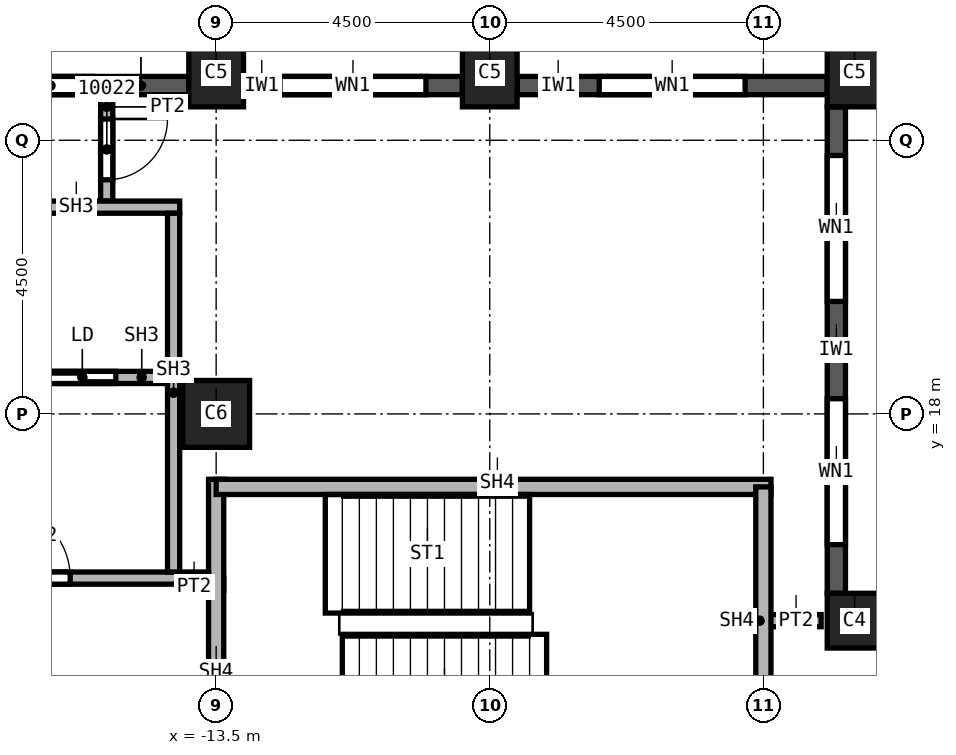
"""IFC4 building model, lengths in metres.
Left out: names, types, materials, properties, quantities, classifications, styles, units other than length and angle.
Written with IfcOpenShell. Run it as: python <this file> out.ifc"""

import sys

from ifc_helpers import new_model, si_unit, direction, frame, frame_2d, origin, origin_2d, place, context, subcontext, project, spatial, rectangle, extrude, element, fill, save


model = new_model("IFC4")
c1 = context("Model", 3, precision=1e-05, world=origin(), true_north=direction((0.0, 1.0)))
c2 = subcontext(c1, "Body", "Model", "MODEL_VIEW")
j1 = project(units=[si_unit("LENGTHUNIT", "METRE"), si_unit("PLANEANGLEUNIT", "RADIAN")], contexts=[c1])
p1 = place(None, origin())
s1 = spatial("IfcSite", under=j1, at=p1, CompositionType="ELEMENT")
p2 = place(p1, origin())
s2 = spatial("IfcBuilding", under=s1, at=p2, CompositionType="ELEMENT")
p3 = place(p2, frame((0.0, 0.0, 174.0)))
s3 = spatial("IfcBuildingStorey", under=s2, at=p3, CompositionType="ELEMENT", Elevation=174.0)
p4 = place(p3, frame((-13.5, 18.0, 0.0), z_axis=(0.0, 0.0, 1.0), x_axis=(1.0, 0.0, 0.0)))
e1 = element("IfcColumn", 1, at=p4, inside=s3, PredefinedType="COLUMN", context=c2, shape_type="SweptSolid", body=[
    extrude(rectangle(XDim=1.1, YDim=1.1, at=origin_2d()), origin(), (0.0, 0.0, 1.0), 3.59),
])
for number, where, z_axis, x_axis in (
    (2, (-3.0, 23.6, 0.0), (0.0, 0.0, 1.0), (1.0, 0.0, 0.0)),
    (3, (-9.0, 23.6, 0.0), (0.0, 0.0, 1.0), (1.0, 0.0, 0.0)),
    (4, (-13.5, 23.6, 0.0), (0.0, 0.0, 1.0), (1.0, 0.0, 0.0)),
):
    element("IfcColumn", number, at=place(p3, frame(where, z_axis=z_axis, x_axis=x_axis)), inside=s3, PredefinedType="COLUMN", context=c2, shape_type="SweptSolid", body=[
        extrude(rectangle(XDim=0.9, YDim=1.1, at=origin_2d()), origin(), (0.0, 0.0, 1.0), 3.59),
    ])
p5 = place(p3, frame((-3.0, 14.6, 0.0), z_axis=(0.0, 0.0, 1.0), x_axis=(1.0, 0.0, 0.0)))
e5 = element("IfcColumn", 5, at=p5, inside=s3, PredefinedType="COLUMN", context=c2, shape_type="SweptSolid", body=[
    extrude(rectangle(XDim=0.9, YDim=0.9, at=origin_2d()), origin(), (0.0, 0.0, 1.0), 3.59),
])
p6 = place(p3, frame((-3.3, 15.05, 0.0), z_axis=(0.0, 0.0, 1.0), x_axis=(0.0, 1.0, 0.0)))
e6 = element("IfcWall", 6, at=p6, inside=s3, PredefinedType="SOLIDWALL", context=c2, shape_type="SweptSolid", body=[
    extrude(rectangle(XDim=8.0, YDim=0.3, at=frame_2d((4.0, 0.0))), origin(), (0.0, 0.0, 1.0), 2.99),
])
p7 = place(p6, frame((0.8, 0.0, 0.8)))
e7 = element("IfcOpeningElement", 7, at=p7, cuts=e6, PredefinedType="OPENING", context=c2, shape_type="SweptSolid", body=[
    extrude(rectangle(XDim=2.4, YDim=1.95, at=frame_2d((1.2, 0.975))), frame((0.0, 0.15, 0.0), z_axis=(0.0, -1.0, 0.0), x_axis=(1.0, 0.0, 0.0)), (0.0, 0.0, 1.0), 0.3),
])
p8 = place(p6, frame((4.8, 0.0, 0.8)))
e8 = element("IfcOpeningElement", 8, at=p8, cuts=e6, PredefinedType="OPENING", context=c2, shape_type="SweptSolid", body=[
    extrude(rectangle(XDim=2.4, YDim=1.95, at=frame_2d((1.2, 0.975))), frame((0.0, 0.15, 0.0), z_axis=(0.0, -1.0, 0.0), x_axis=(1.0, 0.0, 0.0)), (0.0, 0.0, 1.0), 0.3),
])
p9 = place(p3, frame((-3.45, 23.4, 0.0), z_axis=(0.0, 0.0, 1.0), x_axis=(-1.0, 0.0, 0.0)))
e9 = element("IfcWall", 9, at=p9, inside=s3, PredefinedType="SOLIDWALL", context=c2, shape_type="SweptSolid", body=[
    extrude(rectangle(XDim=5.1, YDim=0.3, at=frame_2d((2.55, 0.0))), origin(), (0.0, 0.0, 1.0), 2.99),
])
p10 = place(p9, frame((1.35, 0.0, 0.8)))
e10 = element("IfcOpeningElement", 10, at=p10, cuts=e9, PredefinedType="OPENING", context=c2, shape_type="SweptSolid", body=[
    extrude(rectangle(XDim=2.4, YDim=1.95, at=frame_2d((1.2, 0.975))), frame((0.0, 0.15, 0.0), z_axis=(0.0, -1.0, 0.0), x_axis=(1.0, 0.0, 0.0)), (0.0, 0.0, 1.0), 0.3),
])
p11 = place(p3, frame((-9.45, 23.4, 0.0), z_axis=(0.0, 0.0, 1.0), x_axis=(-1.0, 0.0, 0.0)))
e11 = element("IfcWall", 11, at=p11, inside=s3, PredefinedType="SOLIDWALL", context=c2, shape_type="SweptSolid", body=[
    extrude(rectangle(XDim=3.6, YDim=0.3, at=frame_2d((1.8, 0.0))), origin(), (0.0, 0.0, 1.0), 2.99),
])
p12 = place(p11, frame((0.6, 0.0, 0.8)))
e12 = element("IfcOpeningElement", 12, at=p12, cuts=e11, PredefinedType="OPENING", context=c2, shape_type="SweptSolid", body=[
    extrude(rectangle(XDim=2.4, YDim=1.95, at=frame_2d((1.2, 0.975))), frame((0.0, 0.15, 0.0), z_axis=(0.0, -1.0, 0.0), x_axis=(1.0, 0.0, 0.0)), (0.0, 0.0, 1.0), 0.3),
])
p13 = place(p3, frame((-13.95, 23.4, 0.0), z_axis=(0.0, 0.0, 1.0), x_axis=(-1.0, 0.0, 0.0)))
e13 = element("IfcWall", 13, at=p13, inside=s3, PredefinedType="SOLIDWALL", context=c2, shape_type="SweptSolid", body=[
    extrude(rectangle(XDim=3.6, YDim=0.3, at=frame_2d((1.8, 0.0))), origin(), (0.0, 0.0, 1.0), 2.99),
])
p14 = place(p13, frame((1.575, 0.0, 0.8)))
e14 = element("IfcOpeningElement", 14, at=p14, cuts=e13, PredefinedType="OPENING", context=c2, shape_type="SweptSolid", body=[
    extrude(rectangle(XDim=1.4, YDim=1.95, at=frame_2d((0.7, 0.975))), frame((0.0, 0.15, 0.0), z_axis=(0.0, -1.0, 0.0), x_axis=(1.0, 0.0, 0.0)), (0.0, 0.0, 1.0), 0.3),
])
p15 = place(p3, frame((-15.3, 23.25, 0.0), z_axis=(0.0, 0.0, 1.0), x_axis=(0.0, -1.0, 0.0)))
e15 = element("IfcWall", 15, at=p15, inside=s3, PredefinedType="PARTITIONING", context=c2, shape_type="SweptSolid", body=[
    extrude(rectangle(XDim=1.75, YDim=0.2, at=frame_2d((0.875, 0.0))), origin(), (0.0, 0.0, 1.0), 3.59),
])
p16 = place(p15, frame((0.4, 0.0, 0.0)))
e16 = element("IfcOpeningElement", 16, at=p16, cuts=e15, PredefinedType="OPENING", context=c2, shape_type="SweptSolid", body=[
    extrude(rectangle(XDim=1.0, YDim=2.1, at=frame_2d((0.5, 1.05))), frame((0.0, 0.1, 0.0), z_axis=(0.0, -1.0, 0.0), x_axis=(1.0, 0.0, 0.0)), (0.0, 0.0, 1.0), 0.2),
])
p17 = place(p3, frame((-14.1, 15.2, 0.0), z_axis=(0.0, 0.0, 1.0), x_axis=(1.0, 0.0, 0.0)))
e17 = element("IfcWall", 17, at=p17, inside=s3, PredefinedType="PARTITIONING", context=c2, shape_type="SweptSolid", body=[
    extrude(rectangle(XDim=0.725, YDim=0.2, at=frame_2d((0.363, 0.0))), origin(), (0.0, 0.0, 1.0), 3.59),
])
p18 = place(p3, frame((-4.5, 14.6, 0.0), z_axis=(0.0, 0.0, 1.0), x_axis=(1.0, 0.0, 0.0)))
e18 = element("IfcWall", 18, at=p18, inside=s3, PredefinedType="PARTITIONING", context=c2, shape_type="SweptSolid", body=[
    extrude(rectangle(XDim=0.95, YDim=0.2, at=frame_2d((0.475, 0.0))), origin(), (0.0, 0.0, 1.0), 3.59),
])
p19 = place(p3, frame((-13.5, 12.175, 0.0), z_axis=(0.0, 0.0, 1.0), x_axis=(0.0, 1.0, 0.0)))
e19 = element("IfcWall", 19, at=p19, inside=s3, PredefinedType="SOLIDWALL", context=c2, shape_type="SweptSolid", body=[
    extrude(rectangle(XDim=4.75, YDim=0.25, at=frame_2d((2.375, 0.0))), origin(), (0.0, 0.0, 1.0), 3.59),
])
p20 = place(p3, frame((-13.5, 16.8, 0.0), z_axis=(0.0, 0.0, 1.0), x_axis=(1.0, 0.0, 0.0)))
e20 = element("IfcWall", 20, at=p20, inside=s3, PredefinedType="SOLIDWALL", context=c2, shape_type="SweptSolid", body=[
    extrude(rectangle(XDim=9.125, YDim=0.25, at=frame_2d((4.562, 0.0))), origin(), (0.0, 0.0, 1.0), 3.59),
])
p21 = place(p3, frame((-4.5, 16.8, 0.0), z_axis=(0.0, 0.0, 1.0), x_axis=(0.0, -1.0, 0.0)))
e21 = element("IfcWall", 21, at=p21, inside=s3, PredefinedType="SOLIDWALL", context=c2, shape_type="SweptSolid", body=[
    extrude(rectangle(XDim=4.5, YDim=0.25, at=frame_2d((2.25, 0.0))), origin(), (0.0, 0.0, 1.0), 3.59),
])
p22 = place(p3, frame((-21.9, 15.3, 0.0), z_axis=(0.0, 0.0, 1.0), x_axis=(1.0, 0.0, 0.0)))
e22 = element("IfcWall", 22, at=p22, inside=s3, PredefinedType="SOLIDWALL", context=c2, shape_type="SweptSolid", body=[
    extrude(rectangle(XDim=8.275, YDim=0.2, at=frame_2d((4.137, 0.0))), origin(), (0.0, 0.0, 1.0), 3.59),
])
p23 = place(p22, frame((4.8, 0.0, 0.0)))
e23 = element("IfcOpeningElement", 23, at=p23, cuts=e22, PredefinedType="OPENING", context=c2, shape_type="SweptSolid", body=[
    extrude(rectangle(XDim=1.2, YDim=2.1, at=frame_2d((0.6, 1.05))), frame((0.0, 0.1, 0.0), z_axis=(0.0, -1.0, 0.0), x_axis=(1.0, 0.0, 0.0)), (0.0, 0.0, 1.0), 0.2),
])
p24 = place(p3, frame((-21.9, 21.4, 0.0), z_axis=(0.0, 0.0, 1.0), x_axis=(1.0, 0.0, 0.0)))
e24 = element("IfcWall", 24, at=p24, inside=s3, PredefinedType="SOLIDWALL", context=c2, shape_type="SweptSolid", body=[
    extrude(rectangle(XDim=7.8, YDim=0.2, at=frame_2d((3.9, 0.0))), origin(), (0.0, 0.0, 1.0), 3.59),
])
p25 = place(p24, frame((3.2, 0.0, 0.0)))
e25 = element("IfcOpeningElement", 25, at=p25, cuts=e24, PredefinedType="OPENING", context=c2, shape_type="SweptSolid", body=[
    extrude(rectangle(XDim=1.2, YDim=2.1, at=frame_2d((0.6, 1.05))), frame((0.0, 0.1, 0.0), z_axis=(0.0, -1.0, 0.0), x_axis=(1.0, 0.0, 0.0)), (0.0, 0.0, 1.0), 0.2),
])
p26 = place(p3, frame((-14.2, 15.4, 0.0), z_axis=(0.0, 0.0, 1.0), x_axis=(0.0, 1.0, 0.0)))
e26 = element("IfcWall", 26, at=p26, inside=s3, PredefinedType="SOLIDWALL", context=c2, shape_type="SweptSolid", body=[
    extrude(rectangle(XDim=5.9, YDim=0.2, at=frame_2d((2.95, 0.0))), origin(), (0.0, 0.0, 1.0), 3.59),
])
p27 = place(p3, frame((-17.1, 18.6, 0.0), z_axis=(0.0, 0.0, 1.0), x_axis=(1.0, 0.0, 0.0)))
e27 = element("IfcWall", 27, at=p27, inside=s3, PredefinedType="SOLIDWALL", context=c2, shape_type="SweptSolid", body=[
    extrude(rectangle(XDim=2.8, YDim=0.2, at=frame_2d((1.4, 0.0))), origin(), (0.0, 0.0, 1.0), 3.59),
])
p28 = place(p27, frame((0.85, 0.0, 0.0)))
e28 = element("IfcOpeningElement", 28, at=p28, cuts=e27, PredefinedType="OPENING", context=c2, shape_type="SweptSolid", body=[
    extrude(rectangle(XDim=1.1, YDim=2.1, at=frame_2d((0.55, 1.05))), frame((0.0, 0.1, 0.0), z_axis=(0.0, -1.0, 0.0), x_axis=(1.0, 0.0, 0.0)), (0.0, 0.0, 1.0), 0.2),
])
p29 = place(p7, origin())
e29 = element("IfcWindow", 29, at=p29, inside=s3, PartitioningType="SINGLE_PANEL", PredefinedType="WINDOW", context=c2, shape_type="SweptSolid", body=[
    extrude(rectangle(XDim=2.4, YDim=1.95, at=frame_2d((1.2, 0.975))), frame((0.0, 0.03, 0.0), z_axis=(0.0, -1.0, 0.0), x_axis=(1.0, 0.0, 0.0)), (0.0, 0.0, 1.0), 0.06),
])
fill(e7, e29)
p30 = place(p8, origin())
e30 = element("IfcWindow", 30, at=p30, inside=s3, PartitioningType="SINGLE_PANEL", PredefinedType="WINDOW", context=c2, shape_type="SweptSolid", body=[
    extrude(rectangle(XDim=2.4, YDim=1.95, at=frame_2d((1.2, 0.975))), frame((0.0, 0.03, 0.0), z_axis=(0.0, -1.0, 0.0), x_axis=(1.0, 0.0, 0.0)), (0.0, 0.0, 1.0), 0.06),
])
fill(e8, e30)
p31 = place(p10, origin())
e31 = element("IfcWindow", 31, at=p31, inside=s3, PartitioningType="SINGLE_PANEL", PredefinedType="WINDOW", context=c2, shape_type="SweptSolid", body=[
    extrude(rectangle(XDim=2.4, YDim=1.95, at=frame_2d((1.2, 0.975))), frame((0.0, 0.03, 0.0), z_axis=(0.0, -1.0, 0.0), x_axis=(1.0, 0.0, 0.0)), (0.0, 0.0, 1.0), 0.06),
])
fill(e10, e31)
p32 = place(p12, origin())
e32 = element("IfcWindow", 32, at=p32, inside=s3, PartitioningType="SINGLE_PANEL", PredefinedType="WINDOW", context=c2, shape_type="SweptSolid", body=[
    extrude(rectangle(XDim=2.4, YDim=1.95, at=frame_2d((1.2, 0.975))), frame((0.0, 0.03, 0.0), z_axis=(0.0, -1.0, 0.0), x_axis=(1.0, 0.0, 0.0)), (0.0, 0.0, 1.0), 0.06),
])
fill(e12, e32)
p33 = place(p16, origin())
e33 = element("IfcDoor", 33, at=p33, inside=s3, OperationType="SINGLE_SWING_LEFT", PredefinedType="DOOR", context=c2, shape_type="SweptSolid", body=[
    extrude(rectangle(XDim=1.0, YDim=2.1, at=frame_2d((0.5, 1.05))), frame((0.0, 0.025, 0.0), z_axis=(0.0, -1.0, 0.0), x_axis=(1.0, 0.0, 0.0)), (0.0, 0.0, 1.0), 0.05),
])
fill(e16, e33)
p34 = place(p28, origin())
e34 = element("IfcDoor", 34, at=p34, inside=s3, OperationType="SLIDING_TO_LEFT", PredefinedType="DOOR", context=c2, shape_type="SweptSolid", body=[
    extrude(rectangle(XDim=1.1, YDim=2.1, at=frame_2d((0.55, 1.05))), frame((0.0, 0.025, 0.0), z_axis=(0.0, -1.0, 0.0), x_axis=(1.0, 0.0, 0.0)), (0.0, 0.0, 1.0), 0.05),
])
fill(e28, e34)
p35 = place(p23, origin())
e35 = element("IfcDoor", 35, at=p35, inside=s3, OperationType="SINGLE_SWING_RIGHT", PredefinedType="DOOR", context=c2, shape_type="SweptSolid", body=[
    extrude(rectangle(XDim=1.2, YDim=2.1, at=frame_2d((0.6, 1.05))), frame((0.0, 0.025, 0.0), z_axis=(0.0, -1.0, 0.0), x_axis=(1.0, 0.0, 0.0)), (0.0, 0.0, 1.0), 0.05),
])
fill(e23, e35)
p36 = place(p14, origin())
e36 = element("IfcWindow", 36, at=p36, inside=s3, PartitioningType="SINGLE_PANEL", PredefinedType="WINDOW", context=c2, shape_type="SweptSolid", body=[
    extrude(rectangle(XDim=1.4, YDim=1.95, at=frame_2d((0.7, 0.975))), frame((0.0, 0.03, 0.0), z_axis=(0.0, -1.0, 0.0), x_axis=(1.0, 0.0, 0.0)), (0.0, 0.0, 1.0), 0.06),
])
fill(e14, e36)
save(model, sys.argv[1])
